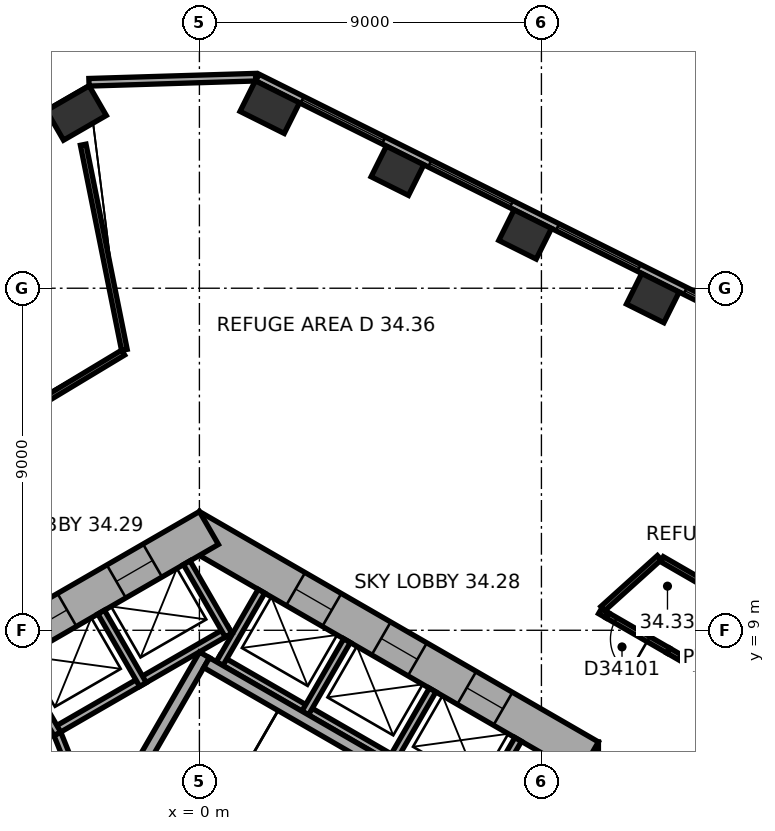
"""IFC4 building model, lengths in metres.
Left out: names, types, materials, properties, quantities, classifications, styles, units other than length and angle.
Written with IfcOpenShell. Run it as: python <this file> out.ifc"""

import sys

from ifc_helpers import new_model, si_unit, direction, frame, frame_2d, origin, origin_2d, place, context, subcontext, project, spatial, rectangle, extrude, element, fill, save


model = new_model("IFC4")
c1 = context("Model", 3, precision=1e-05, world=origin(), true_north=direction((0.0, 1.0)))
c2 = subcontext(c1, "Body", "Model", "MODEL_VIEW")
j1 = project(units=[si_unit("LENGTHUNIT", "METRE"), si_unit("PLANEANGLEUNIT", "RADIAN")], contexts=[c1])
p1 = place(None, origin())
s1 = spatial("IfcSite", under=j1, at=p1, CompositionType="ELEMENT")
p2 = place(p1, origin())
s2 = spatial("IfcBuilding", under=s1, at=p2, CompositionType="ELEMENT")
p3 = place(p2, frame((0.0, 0.0, 139.2)))
s3 = spatial("IfcBuildingStorey", under=s2, at=p3, CompositionType="ELEMENT", Elevation=139.2)
for number, where, z_axis, x_axis in (
    (1, (11.931, 17.74, 0.0), (0.0, 0.0, 1.0), (-0.895, 0.446, 0.0)),
    (2, (8.571, 19.416, 0.0), (0.0, 0.0, 1.0), (-0.895, 0.446, 0.0)),
    (3, (5.211, 21.091, 0.0), (0.0, 0.0, 1.0), (-0.895, 0.446, 0.0)),
):
    element("IfcColumn", number, at=place(p3, frame(where, z_axis=z_axis, x_axis=x_axis)), inside=s3, PredefinedType="COLUMN", context=c2, shape_type="SweptSolid", body=[
        extrude(rectangle(XDim=1.1, YDim=0.9, at=origin_2d()), origin(), (0.0, 0.0, 1.0), 7.4),
    ])
for number, where, z_axis, x_axis in (
    (4, (1.852, 22.766, 0.0), (0.0, 0.0, 1.0), (-0.895, 0.446, 0.0)),
    (5, (-3.238, 22.61, 0.0), (0.0, 0.0, 1.0), (-0.866, -0.5, 0.0)),
):
    element("IfcColumn", number, at=place(p3, frame(where, z_axis=z_axis, x_axis=x_axis)), inside=s3, PredefinedType="COLUMN", context=c2, shape_type="SweptSolid", body=[
        extrude(rectangle(XDim=1.3, YDim=0.9, at=origin_2d()), origin(), (0.0, 0.0, 1.0), 7.4),
    ])
p4 = place(p3, frame((10.0, -6.062, 0.0), z_axis=(0.0, 0.0, 1.0), x_axis=(0.0, 1.0, 0.0)))
e6 = element("IfcWall", 6, at=p4, inside=s3, PredefinedType="SHEAR", context=c2, shape_type="SweptSolid", body=[
    extrude(rectangle(XDim=12.125, YDim=1.0, at=frame_2d((6.062, 0.0))), origin(), (0.0, 0.0, 1.0), 7.4),
])
p5 = place(p4, frame((6.262, 0.0, 0.0)))
e7 = element("IfcOpeningElement", 7, at=p5, cuts=e6, PredefinedType="OPENING", context=c2, shape_type="SweptSolid", body=[
    extrude(rectangle(XDim=1.5, YDim=2.1, at=frame_2d((0.75, 1.05))), frame((0.0, 0.51, 0.0), z_axis=(0.0, -1.0, 0.0), x_axis=(1.0, 0.0, 0.0)), (0.0, 0.0, 1.0), 1.02),
])
p6 = place(p4, frame((1.712, 0.0, 0.0)))
e8 = element("IfcOpeningElement", 8, at=p6, cuts=e6, PredefinedType="OPENING", context=c2, shape_type="SweptSolid", body=[
    extrude(rectangle(XDim=1.1, YDim=2.1, at=frame_2d((0.55, 1.05))), frame((0.0, 0.51, 0.0), z_axis=(0.0, -1.0, 0.0), x_axis=(1.0, 0.0, 0.0)), (0.0, 0.0, 1.0), 1.02),
])
p7 = place(p4, frame((4.312, 0.0, 0.0)))
e9 = element("IfcOpeningElement", 9, at=p7, cuts=e6, PredefinedType="OPENING", context=c2, shape_type="SweptSolid", body=[
    extrude(rectangle(XDim=1.1, YDim=2.1, at=frame_2d((0.55, 1.05))), frame((0.0, 0.51, 0.0), z_axis=(0.0, -1.0, 0.0), x_axis=(1.0, 0.0, 0.0)), (0.0, 0.0, 1.0), 1.02),
])
p8 = place(p3, frame((10.25, 5.629, 0.0), z_axis=(0.0, 0.0, 1.0), x_axis=(-0.866022616891, 0.50000482701, 0.0)))
e10 = element("IfcWall", 10, at=p8, inside=s3, PredefinedType="SHEAR", context=c2, shape_type="SweptSolid", body=[
    extrude(rectangle(XDim=12.125, YDim=1.0, at=frame_2d((6.062, 0.0))), origin(), (0.0, 0.0, 1.0), 7.4),
])
p9 = place(p8, frame((2.612, 0.0, 0.0)))
e11 = element("IfcOpeningElement", 11, at=p9, cuts=e10, PredefinedType="OPENING", context=c2, shape_type="SweptSolid", body=[
    extrude(rectangle(XDim=1.1, YDim=2.1, at=frame_2d((0.55, 1.05))), frame((0.0, 0.51, 0.0), z_axis=(0.0, -1.0, 0.0), x_axis=(1.0, 0.0, 0.0)), (0.0, 0.0, 1.0), 1.02),
])
p10 = place(p8, frame((5.212, 0.0, 0.0)))
e12 = element("IfcOpeningElement", 12, at=p10, cuts=e10, PredefinedType="OPENING", context=c2, shape_type="SweptSolid", body=[
    extrude(rectangle(XDim=1.1, YDim=2.1, at=frame_2d((0.55, 1.05))), frame((0.0, 0.51, 0.0), z_axis=(0.0, -1.0, 0.0), x_axis=(1.0, 0.0, 0.0)), (0.0, 0.0, 1.0), 1.02),
])
p11 = place(p8, frame((7.812, 0.0, 0.0)))
e13 = element("IfcOpeningElement", 13, at=p11, cuts=e10, PredefinedType="OPENING", context=c2, shape_type="SweptSolid", body=[
    extrude(rectangle(XDim=1.1, YDim=2.1, at=frame_2d((0.55, 1.05))), frame((0.0, 0.51, 0.0), z_axis=(0.0, -1.0, 0.0), x_axis=(1.0, 0.0, 0.0)), (0.0, 0.0, 1.0), 1.02),
])
p12 = place(p3, frame((0.25, 11.691, 0.0), z_axis=(0.0, 0.0, 1.0), x_axis=(-0.866022616891, -0.50000482701, 0.0)))
e14 = element("IfcWall", 14, at=p12, inside=s3, PredefinedType="SHEAR", context=c2, shape_type="SweptSolid", body=[
    extrude(rectangle(XDim=12.125, YDim=1.0, at=frame_2d((6.062, 0.0))), origin(), (0.0, 0.0, 1.0), 7.4),
])
p13 = place(p12, frame((6.262, 0.0, 0.0)))
e15 = element("IfcOpeningElement", 15, at=p13, cuts=e14, PredefinedType="OPENING", context=c2, shape_type="SweptSolid", body=[
    extrude(rectangle(XDim=1.5, YDim=2.1, at=frame_2d((0.75, 1.05))), frame((0.0, 0.51, 0.0), z_axis=(0.0, -1.0, 0.0), x_axis=(1.0, 0.0, 0.0)), (0.0, 0.0, 1.0), 1.02),
])
p14 = place(p12, frame((1.712, 0.0, 0.0)))
e16 = element("IfcOpeningElement", 16, at=p14, cuts=e14, PredefinedType="OPENING", context=c2, shape_type="SweptSolid", body=[
    extrude(rectangle(XDim=1.1, YDim=2.1, at=frame_2d((0.55, 1.05))), frame((0.0, 0.51, 0.0), z_axis=(0.0, -1.0, 0.0), x_axis=(1.0, 0.0, 0.0)), (0.0, 0.0, 1.0), 1.02),
])
p15 = place(p12, frame((4.312, 0.0, 0.0)))
e17 = element("IfcOpeningElement", 17, at=p15, cuts=e14, PredefinedType="OPENING", context=c2, shape_type="SweptSolid", body=[
    extrude(rectangle(XDim=1.1, YDim=2.1, at=frame_2d((0.55, 1.05))), frame((0.0, 0.51, 0.0), z_axis=(0.0, -1.0, 0.0), x_axis=(1.0, 0.0, 0.0)), (0.0, 0.0, 1.0), 1.02),
])
p16 = place(p3, frame((19.464, 14.599, 0.0), z_axis=(0.0, 0.0, 1.0), x_axis=(-0.894935755043, 0.446195018289, 0.0)))
e18 = element("IfcWall", 18, at=p16, inside=s3, PredefinedType="STANDARD", context=c2, shape_type="SweptSolid", body=[
    extrude(rectangle(XDim=20.044, YDim=0.2, at=frame_2d((10.022, 0.0))), origin(), (0.0, 0.0, 1.0), 7.4),
])
p17 = place(p16, frame((1.313, 0.0, 0.8)))
e19 = element("IfcOpeningElement", 19, at=p17, cuts=e18, PredefinedType="OPENING", context=c2, shape_type="SweptSolid", body=[
    extrude(rectangle(XDim=2.4, YDim=4.2, at=frame_2d((1.2, 2.1))), frame((0.0, 0.11, 0.0), z_axis=(0.0, -1.0, 0.0), x_axis=(1.0, 0.0, 0.0)), (0.0, 0.0, 1.0), 0.22),
])
p18 = place(p16, frame((5.067, 0.0, 0.8)))
e20 = element("IfcOpeningElement", 20, at=p18, cuts=e18, PredefinedType="OPENING", context=c2, shape_type="SweptSolid", body=[
    extrude(rectangle(XDim=2.4, YDim=4.2, at=frame_2d((1.2, 2.1))), frame((0.0, 0.11, 0.0), z_axis=(0.0, -1.0, 0.0), x_axis=(1.0, 0.0, 0.0)), (0.0, 0.0, 1.0), 0.22),
])
p19 = place(p16, frame((8.821, 0.0, 0.8)))
e21 = element("IfcOpeningElement", 21, at=p19, cuts=e18, PredefinedType="OPENING", context=c2, shape_type="SweptSolid", body=[
    extrude(rectangle(XDim=2.4, YDim=4.2, at=frame_2d((1.2, 2.1))), frame((0.0, 0.11, 0.0), z_axis=(0.0, -1.0, 0.0), x_axis=(1.0, 0.0, 0.0)), (0.0, 0.0, 1.0), 0.22),
])
p20 = place(p16, frame((12.575, 0.0, 0.8)))
e22 = element("IfcOpeningElement", 22, at=p20, cuts=e18, PredefinedType="OPENING", context=c2, shape_type="SweptSolid", body=[
    extrude(rectangle(XDim=2.4, YDim=4.2, at=frame_2d((1.2, 2.1))), frame((0.0, 0.11, 0.0), z_axis=(0.0, -1.0, 0.0), x_axis=(1.0, 0.0, 0.0)), (0.0, 0.0, 1.0), 0.22),
])
p21 = place(p16, frame((16.329, 0.0, 0.8)))
e23 = element("IfcOpeningElement", 23, at=p21, cuts=e18, PredefinedType="OPENING", context=c2, shape_type="SweptSolid", body=[
    extrude(rectangle(XDim=2.4, YDim=4.2, at=frame_2d((1.2, 2.1))), frame((0.0, 0.11, 0.0), z_axis=(0.0, -1.0, 0.0), x_axis=(1.0, 0.0, 0.0)), (0.0, 0.0, 1.0), 0.22),
])
p22 = place(p3, frame((1.479, 23.553, 0.0), z_axis=(0.0, 0.0, 1.0), x_axis=(-0.999534929611, -0.030494663257, 0.0)))
e24 = element("IfcWall", 24, at=p22, inside=s3, PredefinedType="STANDARD", context=c2, shape_type="SweptSolid", body=[
    extrude(rectangle(XDim=4.387, YDim=0.2, at=frame_2d((2.194, 0.0))), origin(), (0.0, 0.0, 1.0), 7.4),
])
p23 = place(p3, frame((-15.687, 8.062, 0.0), z_axis=(0.0, 0.0, 1.0), x_axis=(0.856487923842, 0.516167062406, 0.0)))
e25 = element("IfcWall", 25, at=p23, inside=s3, PredefinedType="STANDARD", context=c2, shape_type="SweptSolid", body=[
    extrude(rectangle(XDim=15.973, YDim=0.15, at=frame_2d((7.987, 0.0))), origin(), (0.0, 0.0, 1.0), 2.6),
])
p24 = place(p23, frame((3.093, 0.0, 0.0)))
e26 = element("IfcOpeningElement", 26, at=p24, cuts=e25, PredefinedType="OPENING", context=c2, shape_type="SweptSolid", body=[
    extrude(rectangle(XDim=1.8, YDim=2.4, at=frame_2d((0.9, 1.2))), frame((0.0, 0.085, 0.0), z_axis=(0.0, -1.0, 0.0), x_axis=(1.0, 0.0, 0.0)), (0.0, 0.0, 1.0), 0.17),
])
p25 = place(p23, frame((11.08, 0.0, 0.0)))
e27 = element("IfcOpeningElement", 27, at=p25, cuts=e25, PredefinedType="OPENING", context=c2, shape_type="SweptSolid", body=[
    extrude(rectangle(XDim=1.8, YDim=2.4, at=frame_2d((0.9, 1.2))), frame((0.0, 0.085, 0.0), z_axis=(0.0, -1.0, 0.0), x_axis=(1.0, 0.0, 0.0)), (0.0, 0.0, 1.0), 0.17),
])
p26 = place(p3, frame((-1.974, 16.378, 0.0), z_axis=(0.0, 0.0, 1.0), x_axis=(-0.196789745995, 0.980445712863, 0.0)))
e28 = element("IfcWall", 28, at=p26, inside=s3, PredefinedType="STANDARD", context=c2, shape_type="SweptSolid", body=[
    extrude(rectangle(XDim=5.506, YDim=0.15, at=frame_2d((2.753, 0.0))), origin(), (0.0, 0.0, 1.0), 2.6),
])
p27 = place(p3, frame((7.424, 4.259, 0.0), z_axis=(0.0, 0.0, 1.0), x_axis=(-0.866026010844, 0.49999894854, 0.0)))
e29 = element("IfcWall", 29, at=p27, inside=s3, PredefinedType="PARTITIONING", context=c2, shape_type="SweptSolid", body=[
    extrude(rectangle(XDim=8.0, YDim=0.2, at=frame_2d((4.0, 0.0))), origin(), (0.0, 0.0, 1.0), 7.12),
])
for number, where, z_axis, x_axis in (
    (30, (7.287, 4.222, 0.0), (0.0, 0.0, 1.0), (0.5, 0.866, 0.0)),
    (31, (5.036, 5.522, 0.0), (0.0, 0.0, 1.0), (0.5, 0.866, 0.0)),
    (32, (2.784, 6.822, 0.0), (0.0, 0.0, 1.0), (0.5, 0.866, 0.0)),
    (33, (0.532, 8.122, 0.0), (0.0, 0.0, 1.0), (0.5, 0.866, 0.0)),
):
    element("IfcWall", number, at=place(p3, frame(where, z_axis=z_axis, x_axis=x_axis)), inside=s3, PredefinedType="PARTITIONING", context=c2, shape_type="SweptSolid", body=[
        extrude(rectangle(XDim=2.2, YDim=0.2, at=frame_2d((1.1, 0.0))), origin(), (0.0, 0.0, 1.0), 7.12),
    ])
p28 = place(p3, frame((0.803, 9.009, 0.0), z_axis=(0.0, 0.0, 1.0), x_axis=(-0.866028230842, -0.499995103361, 0.0)))
e34 = element("IfcWall", 34, at=p28, inside=s3, PredefinedType="PARTITIONING", context=c2, shape_type="SweptSolid", body=[
    extrude(rectangle(XDim=5.4, YDim=0.2, at=frame_2d((2.7, 0.0))), origin(), (0.0, 0.0, 1.0), 7.12),
])
p29 = place(p3, frame((0.767, 8.872, 0.0), z_axis=(0.0, 0.0, 1.0), x_axis=(-0.499994660107, 0.866028486751, 0.0)))
e35 = element("IfcWall", 35, at=p29, inside=s3, PredefinedType="PARTITIONING", context=c2, shape_type="SweptSolid", body=[
    extrude(rectangle(XDim=2.2, YDim=0.2, at=frame_2d((1.1, 0.0))), origin(), (0.0, 0.0, 1.0), 7.12),
])
for number, where, z_axis, x_axis in (
    (36, (-1.485, 7.572, 0.0), (0.0, 0.0, 1.0), (-0.5, 0.866, 0.0)),
    (37, (-3.737, 6.272, 0.0), (0.0, 0.0, 1.0), (-0.5, 0.866, 0.0)),
):
    element("IfcWall", number, at=place(p3, frame(where, z_axis=z_axis, x_axis=x_axis)), inside=s3, PredefinedType="PARTITIONING", context=c2, shape_type="SweptSolid", body=[
        extrude(rectangle(XDim=2.2, YDim=0.2, at=frame_2d((1.1, 0.0))), origin(), (0.0, 0.0, 1.0), 7.12),
    ])
p30 = place(p3, frame((-2.216, 4.282, 0.0), z_axis=(0.0, 0.0, 1.0), x_axis=(0.499977259774, 0.866038532462, 0.0)))
e38 = element("IfcWall", 38, at=p30, inside=s3, PredefinedType="SHEAR", context=c2, shape_type="SweptSolid", body=[
    extrude(rectangle(XDim=4.7, YDim=0.3, at=frame_2d((2.35, 0.0))), origin(), (0.0, 0.0, 1.0), 7.12),
])
p31 = place(p3, frame((6.303, 4.617, 0.0), z_axis=(0.0, 0.0, 1.0), x_axis=(-0.866027801685, 0.499995846692, 0.0)))
e39 = element("IfcWall", 39, at=p31, inside=s3, PredefinedType="SHEAR", context=c2, shape_type="SweptSolid", body=[
    extrude(rectangle(XDim=7.06, YDim=0.3, at=frame_2d((3.53, 0.0))), origin(), (0.0, 0.0, 1.0), 7.12),
])
p32 = place(p3, frame((-2.615, 3.487, 0.0), z_axis=(0.0, 0.0, 1.0), x_axis=(-0.373576831041, 0.92759924068, 0.0)))
e40 = element("IfcWall", 40, at=p32, inside=s3, PredefinedType="PARTITIONING", context=c2, shape_type="SweptSolid", body=[
    extrude(rectangle(XDim=3.002, YDim=0.2, at=frame_2d((1.501, 0.0))), origin(), (0.0, 0.0, 1.0), 7.12),
])
p33 = place(p32, frame((1.15, 0.0, 0.0)))
e41 = element("IfcOpeningElement", 41, at=p33, cuts=e40, PredefinedType="OPENING", context=c2, shape_type="SweptSolid", body=[
    extrude(rectangle(XDim=0.9, YDim=2.1, at=frame_2d((0.45, 1.05))), frame((0.0, 0.11, 0.0), z_axis=(0.0, -1.0, 0.0), x_axis=(1.0, 0.0, 0.0)), (0.0, 0.0, 1.0), 0.22),
])
p34 = place(p3, frame((13.032, 8.064, 0.0), z_axis=(0.0, 0.0, 1.0), x_axis=(-0.865926680471, 0.500170954823, 0.0)))
e42 = element("IfcWall", 42, at=p34, inside=s3, PredefinedType="PARTITIONING", context=c2, shape_type="SweptSolid", body=[
    extrude(rectangle(XDim=0.801, YDim=0.15, at=frame_2d((0.4, 0.0))), origin(), (0.0, 0.0, 1.0), 7.12),
])
p35 = place(p3, frame((12.338, 8.465, 0.0), z_axis=(0.0, 0.0, 1.0), x_axis=(-0.866111002094, 0.499851710062, 0.0)))
e43 = element("IfcWall", 43, at=p35, inside=s3, PredefinedType="PARTITIONING", context=c2, shape_type="SweptSolid", body=[
    extrude(rectangle(XDim=1.853, YDim=0.15, at=frame_2d((0.927, 0.0))), origin(), (0.0, 0.0, 1.0), 7.12),
])
p36 = place(p35, frame((0.603, 0.0, 0.0)))
e44 = element("IfcOpeningElement", 44, at=p36, cuts=e43, PredefinedType="OPENING", context=c2, shape_type="SweptSolid", body=[
    extrude(rectangle(XDim=1.0, YDim=2.1, at=frame_2d((0.5, 1.05))), frame((0.0, 0.085, 0.0), z_axis=(0.0, -1.0, 0.0), x_axis=(1.0, 0.0, 0.0)), (0.0, 0.0, 1.0), 0.17),
])
p37 = place(p3, frame((10.733, 9.391, 0.0), z_axis=(0.0, 0.0, 1.0), x_axis=(-0.866002566612, 0.500039553057, 0.0)))
e45 = element("IfcWall", 45, at=p37, inside=s3, PredefinedType="PARTITIONING", context=c2, shape_type="SweptSolid", body=[
    extrude(rectangle(XDim=0.222, YDim=0.15, at=frame_2d((0.111, 0.0))), origin(), (0.0, 0.0, 1.0), 7.12),
])
p38 = place(p3, frame((10.615, 9.57, 0.0), z_axis=(0.0, 0.0, 1.0), x_axis=(0.742681485431, 0.669644839597, 0.0)))
e46 = element("IfcWall", 46, at=p38, inside=s3, PredefinedType="PARTITIONING", context=c2, shape_type="SweptSolid", body=[
    extrude(rectangle(XDim=2.002, YDim=0.15, at=frame_2d((1.001, 0.0))), origin(), (0.0, 0.0, 1.0), 7.12),
])
p39 = place(p3, frame((12.172, 10.871, 0.0), z_axis=(0.0, 0.0, 1.0), x_axis=(0.86596351105, -0.500107186041, 0.0)))
e47 = element("IfcWall", 47, at=p39, inside=s3, PredefinedType="PARTITIONING", context=c2, shape_type="SweptSolid", body=[
    extrude(rectangle(XDim=3.222, YDim=0.15, at=frame_2d((1.611, 0.0))), origin(), (0.0, 0.0, 1.0), 7.12),
])
p40 = place(p18, origin())
e48 = element("IfcWindow", 48, at=p40, inside=s3, PartitioningType="SINGLE_PANEL", PredefinedType="WINDOW", context=c2, shape_type="SweptSolid", body=[
    extrude(rectangle(XDim=2.4, YDim=4.2, at=frame_2d((1.2, 2.1))), frame((0.0, 0.03, 0.0), z_axis=(0.0, -1.0, 0.0), x_axis=(1.0, 0.0, 0.0)), (0.0, 0.0, 1.0), 0.06),
])
fill(e20, e48)
p41 = place(p19, origin())
e49 = element("IfcWindow", 49, at=p41, inside=s3, PartitioningType="SINGLE_PANEL", PredefinedType="WINDOW", context=c2, shape_type="SweptSolid", body=[
    extrude(rectangle(XDim=2.4, YDim=4.2, at=frame_2d((1.2, 2.1))), frame((0.0, 0.03, 0.0), z_axis=(0.0, -1.0, 0.0), x_axis=(1.0, 0.0, 0.0)), (0.0, 0.0, 1.0), 0.06),
])
fill(e21, e49)
p42 = place(p20, origin())
e50 = element("IfcWindow", 50, at=p42, inside=s3, PartitioningType="SINGLE_PANEL", PredefinedType="WINDOW", context=c2, shape_type="SweptSolid", body=[
    extrude(rectangle(XDim=2.4, YDim=4.2, at=frame_2d((1.2, 2.1))), frame((0.0, 0.03, 0.0), z_axis=(0.0, -1.0, 0.0), x_axis=(1.0, 0.0, 0.0)), (0.0, 0.0, 1.0), 0.06),
])
fill(e22, e50)
p43 = place(p21, origin())
e51 = element("IfcWindow", 51, at=p43, inside=s3, PartitioningType="SINGLE_PANEL", PredefinedType="WINDOW", context=c2, shape_type="SweptSolid", body=[
    extrude(rectangle(XDim=2.4, YDim=4.2, at=frame_2d((1.2, 2.1))), frame((0.0, 0.03, 0.0), z_axis=(0.0, -1.0, 0.0), x_axis=(1.0, 0.0, 0.0)), (0.0, 0.0, 1.0), 0.06),
])
fill(e23, e51)
p44 = place(p9, origin())
e52 = element("IfcDoor", 52, at=p44, inside=s3, OperationType="DOUBLE_DOOR_SLIDING", PredefinedType="DOOR", context=c2, shape_type="SweptSolid", body=[
    extrude(rectangle(XDim=1.1, YDim=2.1, at=frame_2d((0.55, 1.05))), frame((0.0, 0.025, 0.0), z_axis=(0.0, -1.0, 0.0), x_axis=(1.0, 0.0, 0.0)), (0.0, 0.0, 1.0), 0.05),
])
fill(e11, e52)
p45 = place(p10, origin())
e53 = element("IfcDoor", 53, at=p45, inside=s3, OperationType="DOUBLE_DOOR_SLIDING", PredefinedType="DOOR", context=c2, shape_type="SweptSolid", body=[
    extrude(rectangle(XDim=1.1, YDim=2.1, at=frame_2d((0.55, 1.05))), frame((0.0, 0.025, 0.0), z_axis=(0.0, -1.0, 0.0), x_axis=(1.0, 0.0, 0.0)), (0.0, 0.0, 1.0), 0.05),
])
fill(e12, e53)
p46 = place(p11, origin())
e54 = element("IfcDoor", 54, at=p46, inside=s3, OperationType="DOUBLE_DOOR_SLIDING", PredefinedType="DOOR", context=c2, shape_type="SweptSolid", body=[
    extrude(rectangle(XDim=1.1, YDim=2.1, at=frame_2d((0.55, 1.05))), frame((0.0, 0.025, 0.0), z_axis=(0.0, -1.0, 0.0), x_axis=(1.0, 0.0, 0.0)), (0.0, 0.0, 1.0), 0.05),
])
fill(e13, e54)
p47 = place(p14, origin())
e55 = element("IfcDoor", 55, at=p47, inside=s3, OperationType="DOUBLE_DOOR_SLIDING", PredefinedType="DOOR", context=c2, shape_type="SweptSolid", body=[
    extrude(rectangle(XDim=1.1, YDim=2.1, at=frame_2d((0.55, 1.05))), frame((0.0, 0.025, 0.0), z_axis=(0.0, -1.0, 0.0), x_axis=(1.0, 0.0, 0.0)), (0.0, 0.0, 1.0), 0.05),
])
fill(e16, e55)
p48 = place(p15, origin())
e56 = element("IfcDoor", 56, at=p48, inside=s3, OperationType="DOUBLE_DOOR_SLIDING", PredefinedType="DOOR", context=c2, shape_type="SweptSolid", body=[
    extrude(rectangle(XDim=1.1, YDim=2.1, at=frame_2d((0.55, 1.05))), frame((0.0, 0.025, 0.0), z_axis=(0.0, -1.0, 0.0), x_axis=(1.0, 0.0, 0.0)), (0.0, 0.0, 1.0), 0.05),
])
fill(e17, e56)
p49 = place(p36, origin())
e57 = element("IfcDoor", 57, at=p49, inside=s3, OperationType="SINGLE_SWING_LEFT", PredefinedType="DOOR", context=c2, shape_type="SweptSolid", body=[
    extrude(rectangle(XDim=1.0, YDim=2.1, at=frame_2d((0.5, 1.05))), frame((0.0, 0.025, 0.0), z_axis=(0.0, -1.0, 0.0), x_axis=(1.0, 0.0, 0.0)), (0.0, 0.0, 1.0), 0.05),
])
fill(e44, e57)
save(model, sys.argv[1])
